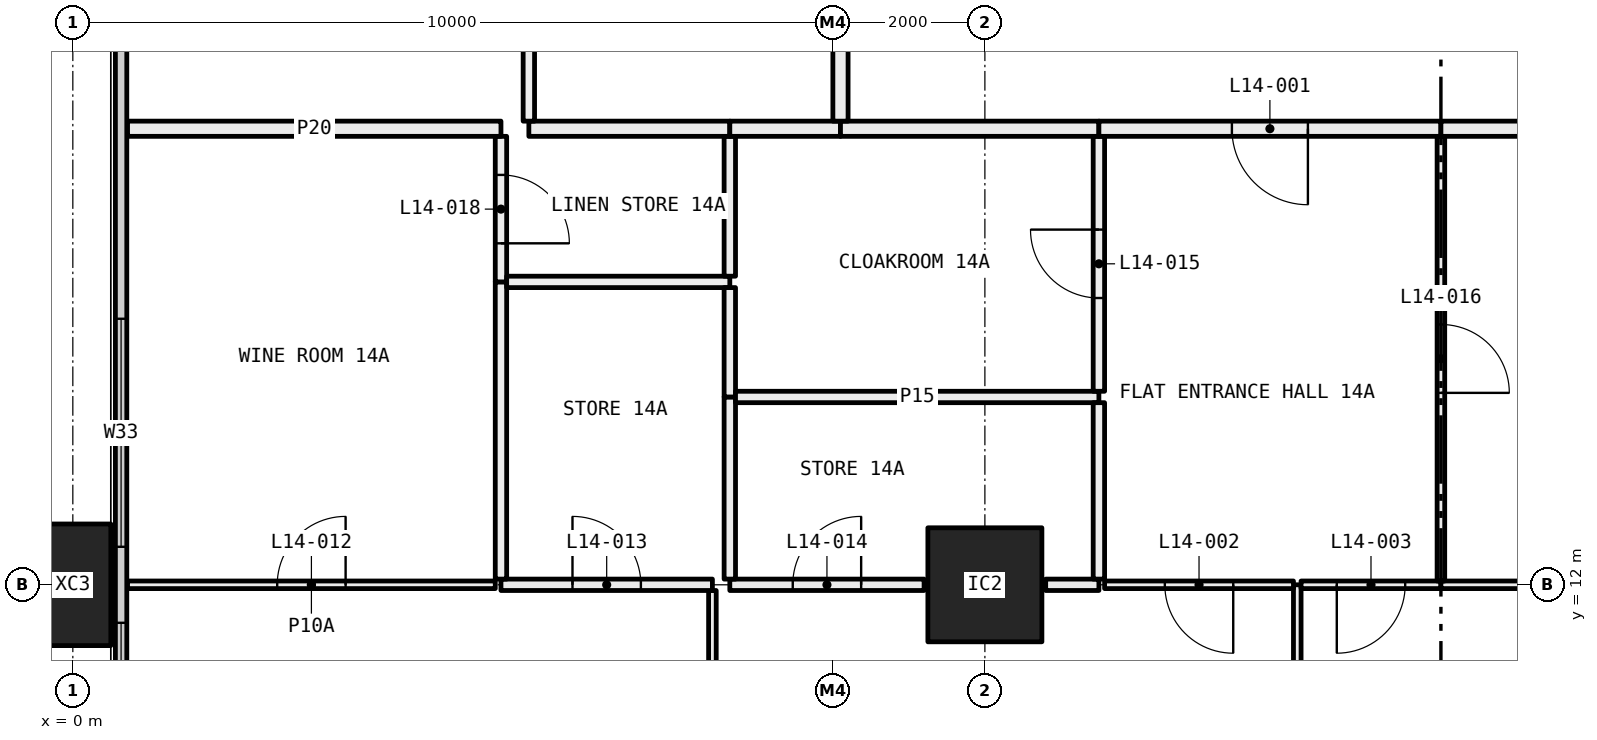
"""IFC4 building model, lengths in metres.
Left out: names, types, materials, properties, quantities, classifications, styles, units other than length and angle.
Written with IfcOpenShell. Run it as: python <this file> out.ifc"""

import sys

from ifc_helpers import new_model, si_unit, direction, frame, frame_2d, origin, origin_2d, place, context, subcontext, project, spatial, rectangle, hollow_rectangle, extrude, element, fill, save


model = new_model("IFC4")
c1 = context("Model", 3, precision=1e-05, world=origin(), true_north=direction((0.0, 1.0)))
c2 = subcontext(c1, "Body", "Model", "MODEL_VIEW")
j1 = project(units=[si_unit("LENGTHUNIT", "METRE"), si_unit("PLANEANGLEUNIT", "RADIAN")], contexts=[c1])
p1 = place(None, origin())
s1 = spatial("IfcSite", under=j1, at=p1, CompositionType="ELEMENT")
p2 = place(p1, origin())
s2 = spatial("IfcBuilding", under=s1, at=p2, CompositionType="ELEMENT")
p3 = place(p2, frame((0.0, 0.0, 61.05)))
s3 = spatial("IfcBuildingStorey", under=s2, at=p3, CompositionType="ELEMENT", Elevation=61.05)
p4 = place(p3, frame((0.0, 12.0, -0.4), z_axis=(0.0, 0.0, 1.0), x_axis=(0.0, 1.0, 0.0)))
e1 = element("IfcColumn", 1, at=p4, inside=s3, PredefinedType="COLUMN", context=c2, shape_type="SweptSolid", body=[
    extrude(hollow_rectangle(XDim=1.6, YDim=1.0, WallThickness=0.065, at=origin_2d()), origin(), (0.0, 0.0, 1.0), 3.45),
])
p5 = place(p3, frame((12.0, 12.0, 0.0), z_axis=(0.0, 0.0, 1.0), x_axis=(1.0, 0.0, 0.0)))
e2 = element("IfcColumn", 2, at=p5, inside=s3, PredefinedType="COLUMN", context=c2, shape_type="SweptSolid", body=[
    extrude(hollow_rectangle(XDim=1.5, YDim=1.5, WallThickness=0.065, at=origin_2d()), origin(), (0.0, 0.0, 1.0), 3.05),
])
p6 = place(p3, frame((0.635, 6.71, 0.0), z_axis=(0.0, 0.0, 1.0), x_axis=(0.0, 1.0, 0.0)))
e3 = element("IfcWall", 3, at=p6, inside=s3, PredefinedType="ELEMENTEDWALL", context=c2, shape_type="SweptSolid", body=[
    extrude(rectangle(XDim=34.58, YDim=0.15, at=frame_2d((17.29, 0.0))), origin(), (0.0, 0.0, 1.0), 3.05),
])
p7 = place(p6, frame((0.29, 0.0, 0.45)))
e4 = element("IfcOpeningElement", 4, at=p7, cuts=e3, PredefinedType="OPENING", context=c2, shape_type="SweptSolid", body=[
    extrude(rectangle(XDim=4.5, YDim=2.55, at=frame_2d((2.25, 1.275))), frame((0.0, 0.085, 0.0), z_axis=(0.0, -1.0, 0.0), x_axis=(1.0, 0.0, 0.0)), (0.0, 0.0, 1.0), 0.17),
])
p8 = place(p6, frame((5.79, 0.0, 0.45)))
e5 = element("IfcOpeningElement", 5, at=p8, cuts=e3, PredefinedType="OPENING", context=c2, shape_type="SweptSolid", body=[
    extrude(rectangle(XDim=3.0, YDim=2.55, at=frame_2d((1.5, 1.275))), frame((0.0, 0.085, 0.0), z_axis=(0.0, -1.0, 0.0), x_axis=(1.0, 0.0, 0.0)), (0.0, 0.0, 1.0), 0.17),
])
p9 = place(p6, frame((13.79, 0.0, 0.45)))
e6 = element("IfcOpeningElement", 6, at=p9, cuts=e3, PredefinedType="OPENING", context=c2, shape_type="SweptSolid", body=[
    extrude(rectangle(XDim=3.0, YDim=2.55, at=frame_2d((1.5, 1.275))), frame((0.0, 0.085, 0.0), z_axis=(0.0, -1.0, 0.0), x_axis=(1.0, 0.0, 0.0)), (0.0, 0.0, 1.0), 0.17),
])
p10 = place(p6, frame((17.79, 0.0, 0.45)))
e7 = element("IfcOpeningElement", 7, at=p10, cuts=e3, PredefinedType="OPENING", context=c2, shape_type="SweptSolid", body=[
    extrude(rectangle(XDim=3.0, YDim=2.55, at=frame_2d((1.5, 1.275))), frame((0.0, 0.085, 0.0), z_axis=(0.0, -1.0, 0.0), x_axis=(1.0, 0.0, 0.0)), (0.0, 0.0, 1.0), 0.17),
])
p11 = place(p6, frame((26.79, 0.0, 0.45)))
e8 = element("IfcOpeningElement", 8, at=p11, cuts=e3, PredefinedType="OPENING", context=c2, shape_type="SweptSolid", body=[
    extrude(rectangle(XDim=2.0, YDim=2.55, at=frame_2d((1.0, 1.275))), frame((0.0, 0.085, 0.0), z_axis=(0.0, -1.0, 0.0), x_axis=(1.0, 0.0, 0.0)), (0.0, 0.0, 1.0), 0.17),
])
p12 = place(p6, frame((29.79, 0.0, 0.45)))
e9 = element("IfcOpeningElement", 9, at=p12, cuts=e3, PredefinedType="OPENING", context=c2, shape_type="SweptSolid", body=[
    extrude(rectangle(XDim=4.5, YDim=2.55, at=frame_2d((2.25, 1.275))), frame((0.0, 0.085, 0.0), z_axis=(0.0, -1.0, 0.0), x_axis=(1.0, 0.0, 0.0)), (0.0, 0.0, 1.0), 0.17),
])
p13 = place(p3, frame((8.415, 6.05, 0.0), z_axis=(0.0, 0.0, 1.0), x_axis=(0.0, 1.0, 0.0)))
e10 = element("IfcWall", 10, at=p13, inside=s3, PredefinedType="PARTITIONING", context=c2, shape_type="SweptSolid", body=[
    extrude(rectangle(XDim=5.875, YDim=0.1, at=frame_2d((2.938, 0.0))), origin(), (0.0, 0.0, 1.0), 2.45),
])
p14 = place(p13, frame((2.488, 0.0, 0.0)))
e11 = element("IfcOpeningElement", 11, at=p14, cuts=e10, PredefinedType="OPENING", context=c2, shape_type="SweptSolid", body=[
    extrude(rectangle(XDim=0.9, YDim=2.1, at=frame_2d((0.45, 1.05))), frame((0.0, 0.06, 0.0), z_axis=(0.0, -1.0, 0.0), x_axis=(1.0, 0.0, 0.0)), (0.0, 0.0, 1.0), 0.12),
])
p15 = place(p3, frame((5.558, 12.0, 0.0), z_axis=(0.0, 0.0, 1.0), x_axis=(-1.0, 0.0, 0.0)))
e12 = element("IfcWall", 12, at=p15, inside=s3, PredefinedType="PARTITIONING", context=c2, shape_type="SweptSolid", body=[
    extrude(rectangle(XDim=4.838, YDim=0.1, at=frame_2d((2.419, 0.0))), origin(), (0.0, 0.0, 1.0), 2.45),
])
p16 = place(p15, frame((1.969, 0.0, 0.0)))
e13 = element("IfcOpeningElement", 13, at=p16, cuts=e12, PredefinedType="OPENING", context=c2, shape_type="SweptSolid", body=[
    extrude(rectangle(XDim=0.9, YDim=2.1, at=frame_2d((0.45, 1.05))), frame((0.0, 0.06, 0.0), z_axis=(0.0, -1.0, 0.0), x_axis=(1.0, 0.0, 0.0)), (0.0, 0.0, 1.0), 0.12),
])
p17 = place(p3, frame((8.415, 12.0, 0.0), z_axis=(0.0, 0.0, 1.0), x_axis=(-1.0, 0.0, 0.0)))
e14 = element("IfcWall", 14, at=p17, inside=s3, PredefinedType="PARTITIONING", context=c2, shape_type="SweptSolid", body=[
    extrude(rectangle(XDim=2.782, YDim=0.15, at=frame_2d((1.391, 0.0))), origin(), (0.0, 0.0, 1.0), 2.45),
])
p18 = place(p17, frame((0.941, 0.0, 0.0)))
e15 = element("IfcOpeningElement", 15, at=p18, cuts=e14, PredefinedType="OPENING", context=c2, shape_type="SweptSolid", body=[
    extrude(rectangle(XDim=0.9, YDim=2.1, at=frame_2d((0.45, 1.05))), frame((0.0, 0.085, 0.0), z_axis=(0.0, -1.0, 0.0), x_axis=(1.0, 0.0, 0.0)), (0.0, 0.0, 1.0), 0.17),
])
p19 = place(p3, frame((16.11, 6.05, 0.0), z_axis=(0.0, 0.0, 1.0), x_axis=(0.0, 1.0, 0.0)))
e16 = element("IfcWall", 16, at=p19, inside=s3, PredefinedType="PARTITIONING", context=c2, shape_type="SweptSolid", body=[
    extrude(rectangle(XDim=5.95, YDim=0.1, at=frame_2d((2.975, 0.0))), origin(), (0.0, 0.0, 1.0), 2.45),
])
p20 = place(p3, frame((11.2, 12.0, 0.0), z_axis=(0.0, 0.0, 1.0), x_axis=(-1.0, 0.0, 0.0)))
e17 = element("IfcWall", 17, at=p20, inside=s3, PredefinedType="PARTITIONING", context=c2, shape_type="SweptSolid", body=[
    extrude(rectangle(XDim=2.556, YDim=0.15, at=frame_2d((1.278, 0.0))), origin(), (0.0, 0.0, 1.0), 2.45),
])
p21 = place(p20, frame((0.828, 0.0, 0.0)))
e18 = element("IfcOpeningElement", 18, at=p21, cuts=e17, PredefinedType="OPENING", context=c2, shape_type="SweptSolid", body=[
    extrude(rectangle(XDim=0.9, YDim=2.1, at=frame_2d((0.45, 1.05))), frame((0.0, 0.085, 0.0), z_axis=(0.0, -1.0, 0.0), x_axis=(1.0, 0.0, 0.0)), (0.0, 0.0, 1.0), 0.17),
])
p22 = place(p3, frame((13.5, 12.0, 0.0), z_axis=(0.0, 0.0, 1.0), x_axis=(-1.0, 0.0, 0.0)))
e19 = element("IfcWall", 19, at=p22, inside=s3, PredefinedType="PARTITIONING", context=c2, shape_type="SweptSolid", body=[
    extrude(rectangle(XDim=0.7, YDim=0.15, at=frame_2d((0.35, 0.0))), origin(), (0.0, 0.0, 1.0), 2.45),
])
p23 = place(p3, frame((16.06, 12.0, 0.0), z_axis=(0.0, 0.0, 1.0), x_axis=(-1.0, 0.0, 0.0)))
e20 = element("IfcWall", 20, at=p23, inside=s3, PredefinedType="PARTITIONING", context=c2, shape_type="SweptSolid", body=[
    extrude(rectangle(XDim=2.485, YDim=0.1, at=frame_2d((1.243, 0.0))), origin(), (0.0, 0.0, 1.0), 2.45),
])
p24 = place(p23, frame((0.792, 0.0, 0.0)))
e21 = element("IfcOpeningElement", 21, at=p24, cuts=e20, PredefinedType="OPENING", context=c2, shape_type="SweptSolid", body=[
    extrude(rectangle(XDim=0.9, YDim=2.1, at=frame_2d((0.45, 1.05))), frame((0.0, 0.06, 0.0), z_axis=(0.0, -1.0, 0.0), x_axis=(1.0, 0.0, 0.0)), (0.0, 0.0, 1.0), 0.12),
])
p25 = place(p3, frame((18.0, 12.0, 0.0), z_axis=(0.0, 0.0, 1.0), x_axis=(-1.0, 0.0, 0.0)))
e22 = element("IfcWall", 22, at=p25, inside=s3, PredefinedType="PARTITIONING", context=c2, shape_type="SweptSolid", body=[
    extrude(rectangle(XDim=1.84, YDim=0.1, at=frame_2d((0.92, 0.0))), origin(), (0.0, 0.0, 1.0), 2.45),
])
p26 = place(p25, frame((0.47, 0.0, 0.0)))
e23 = element("IfcOpeningElement", 23, at=p26, cuts=e22, PredefinedType="OPENING", context=c2, shape_type="SweptSolid", body=[
    extrude(rectangle(XDim=0.9, YDim=2.1, at=frame_2d((0.45, 1.05))), frame((0.0, 0.06, 0.0), z_axis=(0.0, -1.0, 0.0), x_axis=(1.0, 0.0, 0.0)), (0.0, 0.0, 1.0), 0.12),
])
p27 = place(p3, frame((23.2, 12.0, 0.0), z_axis=(0.0, 0.0, 1.0), x_axis=(-1.0, 0.0, 0.0)))
e24 = element("IfcWall", 24, at=p27, inside=s3, PredefinedType="PARTITIONING", context=c2, shape_type="SweptSolid", body=[
    extrude(rectangle(XDim=5.2, YDim=0.1, at=frame_2d((2.6, 0.0))), origin(), (0.0, 0.0, 1.0), 2.45),
])
p28 = place(p3, frame((5.633, 12.075, 0.0), z_axis=(0.0, 0.0, 1.0), x_axis=(0.0, 1.0, 0.0)))
e25 = element("IfcWall", 25, at=p28, inside=s3, PredefinedType="PARTITIONING", context=c2, shape_type="SweptSolid", body=[
    extrude(rectangle(XDim=3.91, YDim=0.15, at=frame_2d((1.955, 0.0))), origin(), (0.0, 0.0, 1.0), 2.45),
])
p29 = place(p3, frame((5.633, 15.985, 0.0), z_axis=(0.0, 0.0, 1.0), x_axis=(0.0, 1.0, 0.0)))
e26 = element("IfcWall", 26, at=p29, inside=s3, PredefinedType="PARTITIONING", context=c2, shape_type="SweptSolid", body=[
    extrude(rectangle(XDim=1.915, YDim=0.15, at=frame_2d((0.958, 0.0))), origin(), (0.0, 0.0, 1.0), 3.05),
])
p30 = place(p29, frame((0.508, 0.0, 0.0)))
e27 = element("IfcOpeningElement", 27, at=p30, cuts=e26, PredefinedType="OPENING", context=c2, shape_type="SweptSolid", body=[
    extrude(rectangle(XDim=0.9, YDim=2.1, at=frame_2d((0.45, 1.05))), frame((0.0, 0.085, 0.0), z_axis=(0.0, -1.0, 0.0), x_axis=(1.0, 0.0, 0.0)), (0.0, 0.0, 1.0), 0.17),
])
p31 = place(p3, frame((5.633, 18.0, 0.0), z_axis=(0.0, 0.0, 1.0), x_axis=(-1.0, 0.0, 0.0)))
e28 = element("IfcWall", 28, at=p31, inside=s3, PredefinedType="PARTITIONING", context=c2, shape_type="SweptSolid", body=[
    extrude(rectangle(XDim=4.913, YDim=0.2, at=frame_2d((2.457, 0.0))), origin(), (0.0, 0.0, 1.0), 3.05),
])
p32 = place(p3, frame((8.644, 15.985, 0.0), z_axis=(0.0, 0.0, 1.0), x_axis=(-1.0, 0.0, 0.0)))
e29 = element("IfcWall", 29, at=p32, inside=s3, PredefinedType="PARTITIONING", context=c2, shape_type="SweptSolid", body=[
    extrude(rectangle(XDim=2.936, YDim=0.15, at=frame_2d((1.468, 0.0))), origin(), (0.0, 0.0, 1.0), 3.05),
])
p33 = place(p3, frame((8.644, 12.075, 0.0), z_axis=(0.0, 0.0, 1.0), x_axis=(0.0, 1.0, 0.0)))
e30 = element("IfcWall", 30, at=p33, inside=s3, PredefinedType="PARTITIONING", context=c2, shape_type="SweptSolid", body=[
    extrude(rectangle(XDim=2.396, YDim=0.15, at=frame_2d((1.198, 0.0))), origin(), (0.0, 0.0, 1.0), 2.45),
])
p34 = place(p3, frame((8.644, 14.471, 0.0), z_axis=(0.0, 0.0, 1.0), x_axis=(0.0, 1.0, 0.0)))
e31 = element("IfcWall", 31, at=p34, inside=s3, PredefinedType="PARTITIONING", context=c2, shape_type="SweptSolid", body=[
    extrude(rectangle(XDim=1.439, YDim=0.15, at=frame_2d((0.719, 0.0))), origin(), (0.0, 0.0, 1.0), 3.05),
])
p35 = place(p3, frame((8.644, 16.06, 0.0), z_axis=(0.0, 0.0, 1.0), x_axis=(0.0, 1.0, 0.0)))
e32 = element("IfcWall", 32, at=p35, inside=s3, PredefinedType="PARTITIONING", context=c2, shape_type="SweptSolid", body=[
    extrude(rectangle(XDim=1.84, YDim=0.15, at=frame_2d((0.92, 0.0))), origin(), (0.0, 0.0, 1.0), 3.05),
])
p36 = place(p3, frame((8.644, 18.0, 0.0), z_axis=(0.0, 0.0, 1.0), x_axis=(-1.0, 0.0, 0.0)))
e33 = element("IfcWall", 33, at=p36, inside=s3, PredefinedType="PARTITIONING", context=c2, shape_type="SweptSolid", body=[
    extrude(rectangle(XDim=2.644, YDim=0.2, at=frame_2d((1.322, 0.0))), origin(), (0.0, 0.0, 1.0), 3.05),
])
p37 = place(p3, frame((13.5, 14.471, 0.0), z_axis=(0.0, 0.0, 1.0), x_axis=(-1.0, 0.0, 0.0)))
e34 = element("IfcWall", 34, at=p37, inside=s3, PredefinedType="PARTITIONING", context=c2, shape_type="SweptSolid", body=[
    extrude(rectangle(XDim=4.781, YDim=0.15, at=frame_2d((2.391, 0.0))), origin(), (0.0, 0.0, 1.0), 3.05),
])
p38 = place(p3, frame((13.5, 12.075, 0.0), z_axis=(0.0, 0.0, 1.0), x_axis=(0.0, 1.0, 0.0)))
e35 = element("IfcWall", 35, at=p38, inside=s3, PredefinedType="PARTITIONING", context=c2, shape_type="SweptSolid", body=[
    extrude(rectangle(XDim=2.321, YDim=0.15, at=frame_2d((1.161, 0.0))), origin(), (0.0, 0.0, 1.0), 2.45),
])
p39 = place(p3, frame((13.5, 14.546, 0.0), z_axis=(0.0, 0.0, 1.0), x_axis=(0.0, 1.0, 0.0)))
e36 = element("IfcWall", 36, at=p39, inside=s3, PredefinedType="PARTITIONING", context=c2, shape_type="SweptSolid", body=[
    extrude(rectangle(XDim=3.354, YDim=0.15, at=frame_2d((1.677, 0.0))), origin(), (0.0, 0.0, 1.0), 3.05),
])
p40 = place(p39, frame((1.227, 0.0, 0.0)))
e37 = element("IfcOpeningElement", 37, at=p40, cuts=e36, PredefinedType="OPENING", context=c2, shape_type="SweptSolid", body=[
    extrude(rectangle(XDim=0.9, YDim=2.1, at=frame_2d((0.45, 1.05))), frame((0.0, 0.085, 0.0), z_axis=(0.0, -1.0, 0.0), x_axis=(1.0, 0.0, 0.0)), (0.0, 0.0, 1.0), 0.17),
])
p41 = place(p3, frame((10.1, 18.0, 0.0), z_axis=(0.0, 0.0, 1.0), x_axis=(-1.0, 0.0, 0.0)))
e38 = element("IfcWall", 38, at=p41, inside=s3, PredefinedType="PARTITIONING", context=c2, shape_type="SweptSolid", body=[
    extrude(rectangle(XDim=1.456, YDim=0.2, at=frame_2d((0.728, 0.0))), origin(), (0.0, 0.0, 1.0), 3.05),
])
p42 = place(p3, frame((13.5, 18.0, 0.0), z_axis=(0.0, 0.0, 1.0), x_axis=(-1.0, 0.0, 0.0)))
e39 = element("IfcWall", 39, at=p42, inside=s3, PredefinedType="PARTITIONING", context=c2, shape_type="SweptSolid", body=[
    extrude(rectangle(XDim=3.4, YDim=0.2, at=frame_2d((1.7, 0.0))), origin(), (0.0, 0.0, 1.0), 3.05),
])
p43 = place(p3, frame((18.0, 12.05, 0.0), z_axis=(0.0, 0.0, 1.0), x_axis=(0.0, 1.0, 0.0)))
e40 = element("IfcWall", 40, at=p43, inside=s3, PredefinedType="PARTITIONING", context=c2, shape_type="SweptSolid", body=[
    extrude(rectangle(XDim=5.85, YDim=0.1, at=frame_2d((2.925, 0.0))), origin(), (0.0, 0.0, 1.0), 2.45),
])
p44 = place(p43, frame((2.475, 0.0, 0.0)))
e41 = element("IfcOpeningElement", 41, at=p44, cuts=e40, PredefinedType="OPENING", context=c2, shape_type="SweptSolid", body=[
    extrude(rectangle(XDim=0.9, YDim=2.1, at=frame_2d((0.45, 1.05))), frame((0.0, 0.06, 0.0), z_axis=(0.0, -1.0, 0.0), x_axis=(1.0, 0.0, 0.0)), (0.0, 0.0, 1.0), 0.12),
])
p45 = place(p3, frame((18.0, 18.0, 0.0), z_axis=(0.0, 0.0, 1.0), x_axis=(-1.0, 0.0, 0.0)))
e42 = element("IfcWall", 42, at=p45, inside=s3, PredefinedType="PARTITIONING", context=c2, shape_type="SweptSolid", body=[
    extrude(rectangle(XDim=4.5, YDim=0.2, at=frame_2d((2.25, 0.0))), origin(), (0.0, 0.0, 1.0), 3.05),
])
p46 = place(p45, frame((1.75, 0.0, 0.0)))
e43 = element("IfcOpeningElement", 43, at=p46, cuts=e42, PredefinedType="OPENING", context=c2, shape_type="SweptSolid", body=[
    extrude(rectangle(XDim=1.0, YDim=2.1, at=frame_2d((0.5, 1.05))), frame((0.0, 0.11, 0.0), z_axis=(0.0, -1.0, 0.0), x_axis=(1.0, 0.0, 0.0)), (0.0, 0.0, 1.0), 0.22),
])
p47 = place(p3, frame((25.9, 18.0, 0.0), z_axis=(0.0, 0.0, 1.0), x_axis=(-1.0, 0.0, 0.0)))
e44 = element("IfcWall", 44, at=p47, inside=s3, PredefinedType="PARTITIONING", context=c2, shape_type="SweptSolid", body=[
    extrude(rectangle(XDim=7.9, YDim=0.2, at=frame_2d((3.95, 0.0))), origin(), (0.0, 0.0, 1.0), 3.05),
])
p48 = place(p3, frame((6.0, 18.1, 0.0), z_axis=(0.0, 0.0, 1.0), x_axis=(0.0, 1.0, 0.0)))
e45 = element("IfcWall", 45, at=p48, inside=s3, PredefinedType="PARTITIONING", context=c2, shape_type="SweptSolid", body=[
    extrude(rectangle(XDim=4.4, YDim=0.15, at=frame_2d((2.2, 0.0))), origin(), (0.0, 0.0, 1.0), 3.05),
])
p49 = place(p48, frame((1.75, 0.0, 0.0)))
e46 = element("IfcOpeningElement", 46, at=p49, cuts=e45, PredefinedType="OPENING", context=c2, shape_type="SweptSolid", body=[
    extrude(rectangle(XDim=0.9, YDim=2.1, at=frame_2d((0.45, 1.05))), frame((0.0, 0.085, 0.0), z_axis=(0.0, -1.0, 0.0), x_axis=(1.0, 0.0, 0.0)), (0.0, 0.0, 1.0), 0.17),
])
p50 = place(p3, frame((10.1, 18.1, 0.0), z_axis=(0.0, 0.0, 1.0), x_axis=(0.0, 1.0, 0.0)))
e47 = element("IfcWall", 47, at=p50, inside=s3, PredefinedType="PARTITIONING", context=c2, shape_type="SweptSolid", body=[
    extrude(rectangle(XDim=4.4, YDim=0.2, at=frame_2d((2.2, 0.0))), origin(), (0.0, 0.0, 1.0), 3.05),
])
p51 = place(p7, origin())
e48 = element("IfcWindow", 48, at=p51, inside=s3, PartitioningType="SINGLE_PANEL", PredefinedType="WINDOW", context=c2, shape_type="SweptSolid", body=[
    extrude(rectangle(XDim=4.5, YDim=2.55, at=frame_2d((2.25, 1.275))), frame((0.0, 0.03, 0.0), z_axis=(0.0, -1.0, 0.0), x_axis=(1.0, 0.0, 0.0)), (0.0, 0.0, 1.0), 0.06),
])
fill(e4, e48)
p52 = place(p8, origin())
e49 = element("IfcWindow", 49, at=p52, inside=s3, PartitioningType="SINGLE_PANEL", PredefinedType="WINDOW", context=c2, shape_type="SweptSolid", body=[
    extrude(rectangle(XDim=3.0, YDim=2.55, at=frame_2d((1.5, 1.275))), frame((0.0, 0.03, 0.0), z_axis=(0.0, -1.0, 0.0), x_axis=(1.0, 0.0, 0.0)), (0.0, 0.0, 1.0), 0.06),
])
fill(e5, e49)
p53 = place(p46, origin())
e50 = element("IfcDoor", 50, at=p53, inside=s3, OperationType="SINGLE_SWING_RIGHT", PredefinedType="DOOR", context=c2, shape_type="SweptSolid", body=[
    extrude(rectangle(XDim=1.0, YDim=2.1, at=frame_2d((0.5, 1.05))), frame((0.0, 0.025, 0.0), z_axis=(0.0, -1.0, 0.0), x_axis=(1.0, 0.0, 0.0)), (0.0, 0.0, 1.0), 0.05),
])
fill(e43, e50)
p54 = place(p24, origin())
e51 = element("IfcDoor", 51, at=p54, inside=s3, OperationType="SINGLE_SWING_RIGHT", PredefinedType="DOOR", context=c2, shape_type="SweptSolid", body=[
    extrude(rectangle(XDim=0.9, YDim=2.1, at=frame_2d((0.45, 1.05))), frame((0.0, 0.025, 0.0), z_axis=(0.0, -1.0, 0.0), x_axis=(1.0, 0.0, 0.0)), (0.0, 0.0, 1.0), 0.05),
])
fill(e21, e51)
p55 = place(p26, origin())
e52 = element("IfcDoor", 52, at=p55, inside=s3, OperationType="SINGLE_SWING_LEFT", PredefinedType="DOOR", context=c2, shape_type="SweptSolid", body=[
    extrude(rectangle(XDim=0.9, YDim=2.1, at=frame_2d((0.45, 1.05))), frame((0.0, 0.025, 0.0), z_axis=(0.0, -1.0, 0.0), x_axis=(1.0, 0.0, 0.0)), (0.0, 0.0, 1.0), 0.05),
])
fill(e23, e52)
p56 = place(p16, frame((0.9, 0.0, 0.0), x_axis=(-1.0, 0.0, 0.0)))
e53 = element("IfcDoor", 53, at=p56, inside=s3, OperationType="SINGLE_SWING_LEFT", PredefinedType="DOOR", context=c2, shape_type="SweptSolid", body=[
    extrude(rectangle(XDim=0.9, YDim=2.1, at=frame_2d((0.45, 1.05))), frame((0.0, 0.025, 0.0), z_axis=(0.0, -1.0, 0.0), x_axis=(1.0, 0.0, 0.0)), (0.0, 0.0, 1.0), 0.05),
])
fill(e13, e53)
p57 = place(p18, frame((0.9, 0.0, 0.0), x_axis=(-1.0, 0.0, 0.0)))
e54 = element("IfcDoor", 54, at=p57, inside=s3, OperationType="SINGLE_SWING_RIGHT", PredefinedType="DOOR", context=c2, shape_type="SweptSolid", body=[
    extrude(rectangle(XDim=0.9, YDim=2.1, at=frame_2d((0.45, 1.05))), frame((0.0, 0.025, 0.0), z_axis=(0.0, -1.0, 0.0), x_axis=(1.0, 0.0, 0.0)), (0.0, 0.0, 1.0), 0.05),
])
fill(e15, e54)
p58 = place(p21, frame((0.9, 0.0, 0.0), x_axis=(-1.0, 0.0, 0.0)))
e55 = element("IfcDoor", 55, at=p58, inside=s3, OperationType="SINGLE_SWING_LEFT", PredefinedType="DOOR", context=c2, shape_type="SweptSolid", body=[
    extrude(rectangle(XDim=0.9, YDim=2.1, at=frame_2d((0.45, 1.05))), frame((0.0, 0.025, 0.0), z_axis=(0.0, -1.0, 0.0), x_axis=(1.0, 0.0, 0.0)), (0.0, 0.0, 1.0), 0.05),
])
fill(e18, e55)
p59 = place(p40, origin())
e56 = element("IfcDoor", 56, at=p59, inside=s3, OperationType="SINGLE_SWING_LEFT", PredefinedType="DOOR", context=c2, shape_type="SweptSolid", body=[
    extrude(rectangle(XDim=0.9, YDim=2.1, at=frame_2d((0.45, 1.05))), frame((0.0, 0.025, 0.0), z_axis=(0.0, -1.0, 0.0), x_axis=(1.0, 0.0, 0.0)), (0.0, 0.0, 1.0), 0.05),
])
fill(e37, e56)
p60 = place(p44, frame((0.9, 0.0, 0.0), x_axis=(-1.0, 0.0, 0.0)))
e57 = element("IfcDoor", 57, at=p60, inside=s3, OperationType="SINGLE_SWING_LEFT", PredefinedType="DOOR", context=c2, shape_type="SweptSolid", body=[
    extrude(rectangle(XDim=0.9, YDim=2.1, at=frame_2d((0.45, 1.05))), frame((0.0, 0.025, 0.0), z_axis=(0.0, -1.0, 0.0), x_axis=(1.0, 0.0, 0.0)), (0.0, 0.0, 1.0), 0.05),
])
fill(e41, e57)
p61 = place(p30, frame((0.9, 0.0, 0.0), x_axis=(-1.0, 0.0, 0.0)))
e58 = element("IfcDoor", 58, at=p61, inside=s3, OperationType="SINGLE_SWING_LEFT", PredefinedType="DOOR", context=c2, shape_type="SweptSolid", body=[
    extrude(rectangle(XDim=0.9, YDim=2.1, at=frame_2d((0.45, 1.05))), frame((0.0, 0.025, 0.0), z_axis=(0.0, -1.0, 0.0), x_axis=(1.0, 0.0, 0.0)), (0.0, 0.0, 1.0), 0.05),
])
fill(e27, e58)
save(model, sys.argv[1])
